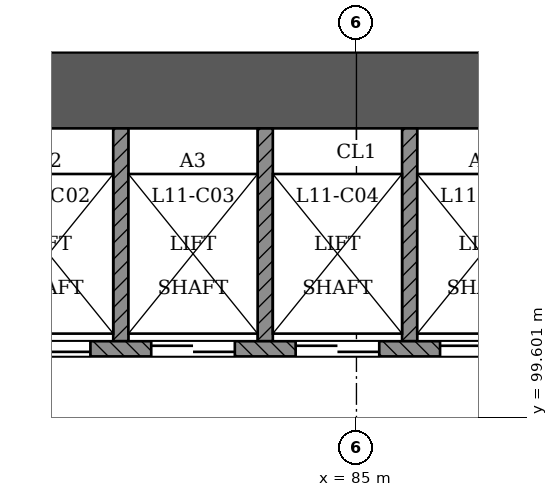
"""IFC4 building model, lengths in metres.
Left out: names, types, materials, properties, quantities, classifications, styles, units other than length and angle.
Written with IfcOpenShell. Run it as: python <this file> out.ifc"""

import sys

from ifc_helpers import new_model, si_unit, direction, frame, frame_2d, origin, place, context, subcontext, project, spatial, rectangle, extrude, element, fill, save


model = new_model("IFC4")
c1 = context("Model", 3, precision=1e-05, world=origin(), true_north=direction((0.0, 1.0)))
c2 = subcontext(c1, "Body", "Model", "MODEL_VIEW")
j1 = project(units=[si_unit("LENGTHUNIT", "METRE"), si_unit("PLANEANGLEUNIT", "RADIAN")], contexts=[c1])
p1 = place(None, origin())
s1 = spatial("IfcSite", under=j1, at=p1, CompositionType="ELEMENT")
p2 = place(p1, origin())
s2 = spatial("IfcBuilding", under=s1, at=p2, CompositionType="ELEMENT")
p3 = place(p2, frame((0.0, 0.0, 48.6)))
s3 = spatial("IfcBuildingStorey", under=s2, at=p3, CompositionType="ELEMENT", Elevation=48.6)
p4 = place(p3, frame((97.5, 103.9, 0.0), z_axis=(0.0, 0.0, 1.0), x_axis=(-1.0, 0.0, 0.0)))
e1 = element("IfcWall", 1, at=p4, inside=s3, PredefinedType="SHEAR", context=c2, shape_type="SweptSolid", body=[
    extrude(rectangle(XDim=25.5, YDim=1.0, at=frame_2d((12.75, 0.0))), origin(), (0.0, 0.0, 1.0), 3.6),
])
p5 = place(p3, frame((75.9, 100.5, 0.0), z_axis=(0.0, 0.0, 1.0), x_axis=(1.0, 0.0, 0.0)))
e2 = element("IfcWall", 2, at=p5, inside=s3, PredefinedType="SOLIDWALL", context=c2, shape_type="SweptSolid", body=[
    extrude(rectangle(XDim=18.2, YDim=0.2, at=frame_2d((9.1, 0.0))), origin(), (0.0, 0.0, 1.0), 3.1),
])
p6 = place(p5, frame((2.6, 0.0, 0.0)))
e3 = element("IfcOpeningElement", 3, at=p6, cuts=e2, PredefinedType="OPENING", context=c2, shape_type="SweptSolid", body=[
    extrude(rectangle(XDim=1.1, YDim=2.1, at=frame_2d((0.55, 1.05))), frame((0.0, 0.11, 0.0), z_axis=(0.0, -1.0, 0.0), x_axis=(1.0, 0.0, 0.0)), (0.0, 0.0, 1.0), 0.221),
])
p7 = place(p5, frame((4.5, 0.0, 0.0)))
e4 = element("IfcOpeningElement", 4, at=p7, cuts=e2, PredefinedType="OPENING", context=c2, shape_type="SweptSolid", body=[
    extrude(rectangle(XDim=1.1, YDim=2.1, at=frame_2d((0.55, 1.05))), frame((0.0, 0.11, 0.0), z_axis=(0.0, -1.0, 0.0), x_axis=(1.0, 0.0, 0.0)), (0.0, 0.0, 1.0), 0.221),
])
p8 = place(p5, frame((6.4, 0.0, 0.0)))
e5 = element("IfcOpeningElement", 5, at=p8, cuts=e2, PredefinedType="OPENING", context=c2, shape_type="SweptSolid", body=[
    extrude(rectangle(XDim=1.1, YDim=2.1, at=frame_2d((0.55, 1.05))), frame((0.0, 0.11, 0.0), z_axis=(0.0, -1.0, 0.0), x_axis=(1.0, 0.0, 0.0)), (0.0, 0.0, 1.0), 0.221),
])
p9 = place(p5, frame((8.3, 0.0, 0.0)))
e6 = element("IfcOpeningElement", 6, at=p9, cuts=e2, PredefinedType="OPENING", context=c2, shape_type="SweptSolid", body=[
    extrude(rectangle(XDim=1.1, YDim=2.1, at=frame_2d((0.55, 1.05))), frame((0.0, 0.11, 0.0), z_axis=(0.0, -1.0, 0.0), x_axis=(1.0, 0.0, 0.0)), (0.0, 0.0, 1.0), 0.221),
])
p10 = place(p5, frame((10.2, 0.0, 0.0)))
e7 = element("IfcOpeningElement", 7, at=p10, cuts=e2, PredefinedType="OPENING", context=c2, shape_type="SweptSolid", body=[
    extrude(rectangle(XDim=1.1, YDim=2.1, at=frame_2d((0.55, 1.05))), frame((0.0, 0.11, 0.0), z_axis=(0.0, -1.0, 0.0), x_axis=(1.0, 0.0, 0.0)), (0.0, 0.0, 1.0), 0.221),
])
p11 = place(p5, frame((12.1, 0.0, 0.0)))
e8 = element("IfcOpeningElement", 8, at=p11, cuts=e2, PredefinedType="OPENING", context=c2, shape_type="SweptSolid", body=[
    extrude(rectangle(XDim=1.1, YDim=2.1, at=frame_2d((0.55, 1.05))), frame((0.0, 0.11, 0.0), z_axis=(0.0, -1.0, 0.0), x_axis=(1.0, 0.0, 0.0)), (0.0, 0.0, 1.0), 0.221),
])
p12 = place(p5, frame((14.0, 0.0, 0.0)))
e9 = element("IfcOpeningElement", 9, at=p12, cuts=e2, PredefinedType="OPENING", context=c2, shape_type="SweptSolid", body=[
    extrude(rectangle(XDim=1.1, YDim=2.1, at=frame_2d((0.55, 1.05))), frame((0.0, 0.11, 0.0), z_axis=(0.0, -1.0, 0.0), x_axis=(1.0, 0.0, 0.0)), (0.0, 0.0, 1.0), 0.221),
])
p13 = place(p5, frame((0.65, 0.0, 0.0)))
e10 = element("IfcOpeningElement", 10, at=p13, cuts=e2, PredefinedType="OPENING", context=c2, shape_type="SweptSolid", body=[
    extrude(rectangle(XDim=1.0, YDim=2.1, at=frame_2d((0.5, 1.05))), frame((0.0, 0.11, 0.0), z_axis=(0.0, -1.0, 0.0), x_axis=(1.0, 0.0, 0.0)), (0.0, 0.0, 1.0), 0.221),
])
p14 = place(p5, frame((16.3, 0.0, 0.0)))
e11 = element("IfcOpeningElement", 11, at=p14, cuts=e2, PredefinedType="OPENING", context=c2, shape_type="SweptSolid", body=[
    extrude(rectangle(XDim=1.0, YDim=2.1, at=frame_2d((0.5, 1.05))), frame((0.0, 0.11, 0.0), z_axis=(0.0, -1.0, 0.0), x_axis=(1.0, 0.0, 0.0)), (0.0, 0.0, 1.0), 0.221),
])
for number, where, z_axis, x_axis in (
    (12, (81.9, 100.6, 0.0), (0.0, 0.0, 1.0), (0.0, 1.0, 0.0)),
    (13, (83.8, 100.6, 0.0), (0.0, 0.0, 1.0), (0.0, 1.0, 0.0)),
    (14, (85.7, 100.6, 0.0), (0.0, 0.0, 1.0), (0.0, 1.0, 0.0)),
):
    element("IfcWall", number, at=place(p3, frame(where, z_axis=z_axis, x_axis=x_axis)), inside=s3, PredefinedType="SOLIDWALL", context=c2, shape_type="SweptSolid", body=[
        extrude(rectangle(XDim=2.8, YDim=0.2, at=frame_2d((1.4, 0.0))), origin(), (0.0, 0.0, 1.0), 3.1),
    ])
p15 = place(p7, origin())
e15 = element("IfcDoor", 15, at=p15, inside=s3, OperationType="SLIDING_TO_LEFT", PredefinedType="NOTDEFINED", context=c2, shape_type="SweptSolid", body=[
    extrude(rectangle(XDim=1.1, YDim=2.1, at=frame_2d((0.55, 1.05))), frame((0.0, 0.025, 0.0), z_axis=(0.0, -1.0, 0.0), x_axis=(1.0, 0.0, 0.0)), (0.0, 0.0, 1.0), 0.05),
])
fill(e4, e15)
p16 = place(p8, origin())
e16 = element("IfcDoor", 16, at=p16, inside=s3, OperationType="SLIDING_TO_RIGHT", PredefinedType="NOTDEFINED", context=c2, shape_type="SweptSolid", body=[
    extrude(rectangle(XDim=1.1, YDim=2.1, at=frame_2d((0.55, 1.05))), frame((0.0, 0.025, 0.0), z_axis=(0.0, -1.0, 0.0), x_axis=(1.0, 0.0, 0.0)), (0.0, 0.0, 1.0), 0.05),
])
fill(e5, e16)
p17 = place(p9, origin())
e17 = element("IfcDoor", 17, at=p17, inside=s3, OperationType="SLIDING_TO_LEFT", PredefinedType="NOTDEFINED", context=c2, shape_type="SweptSolid", body=[
    extrude(rectangle(XDim=1.1, YDim=2.1, at=frame_2d((0.55, 1.05))), frame((0.0, 0.025, 0.0), z_axis=(0.0, -1.0, 0.0), x_axis=(1.0, 0.0, 0.0)), (0.0, 0.0, 1.0), 0.05),
])
fill(e6, e17)
p18 = place(p10, origin())
e18 = element("IfcDoor", 18, at=p18, inside=s3, OperationType="SLIDING_TO_RIGHT", PredefinedType="NOTDEFINED", context=c2, shape_type="SweptSolid", body=[
    extrude(rectangle(XDim=1.1, YDim=2.1, at=frame_2d((0.55, 1.05))), frame((0.0, 0.025, 0.0), z_axis=(0.0, -1.0, 0.0), x_axis=(1.0, 0.0, 0.0)), (0.0, 0.0, 1.0), 0.05),
])
fill(e7, e18)
save(model, sys.argv[1])
